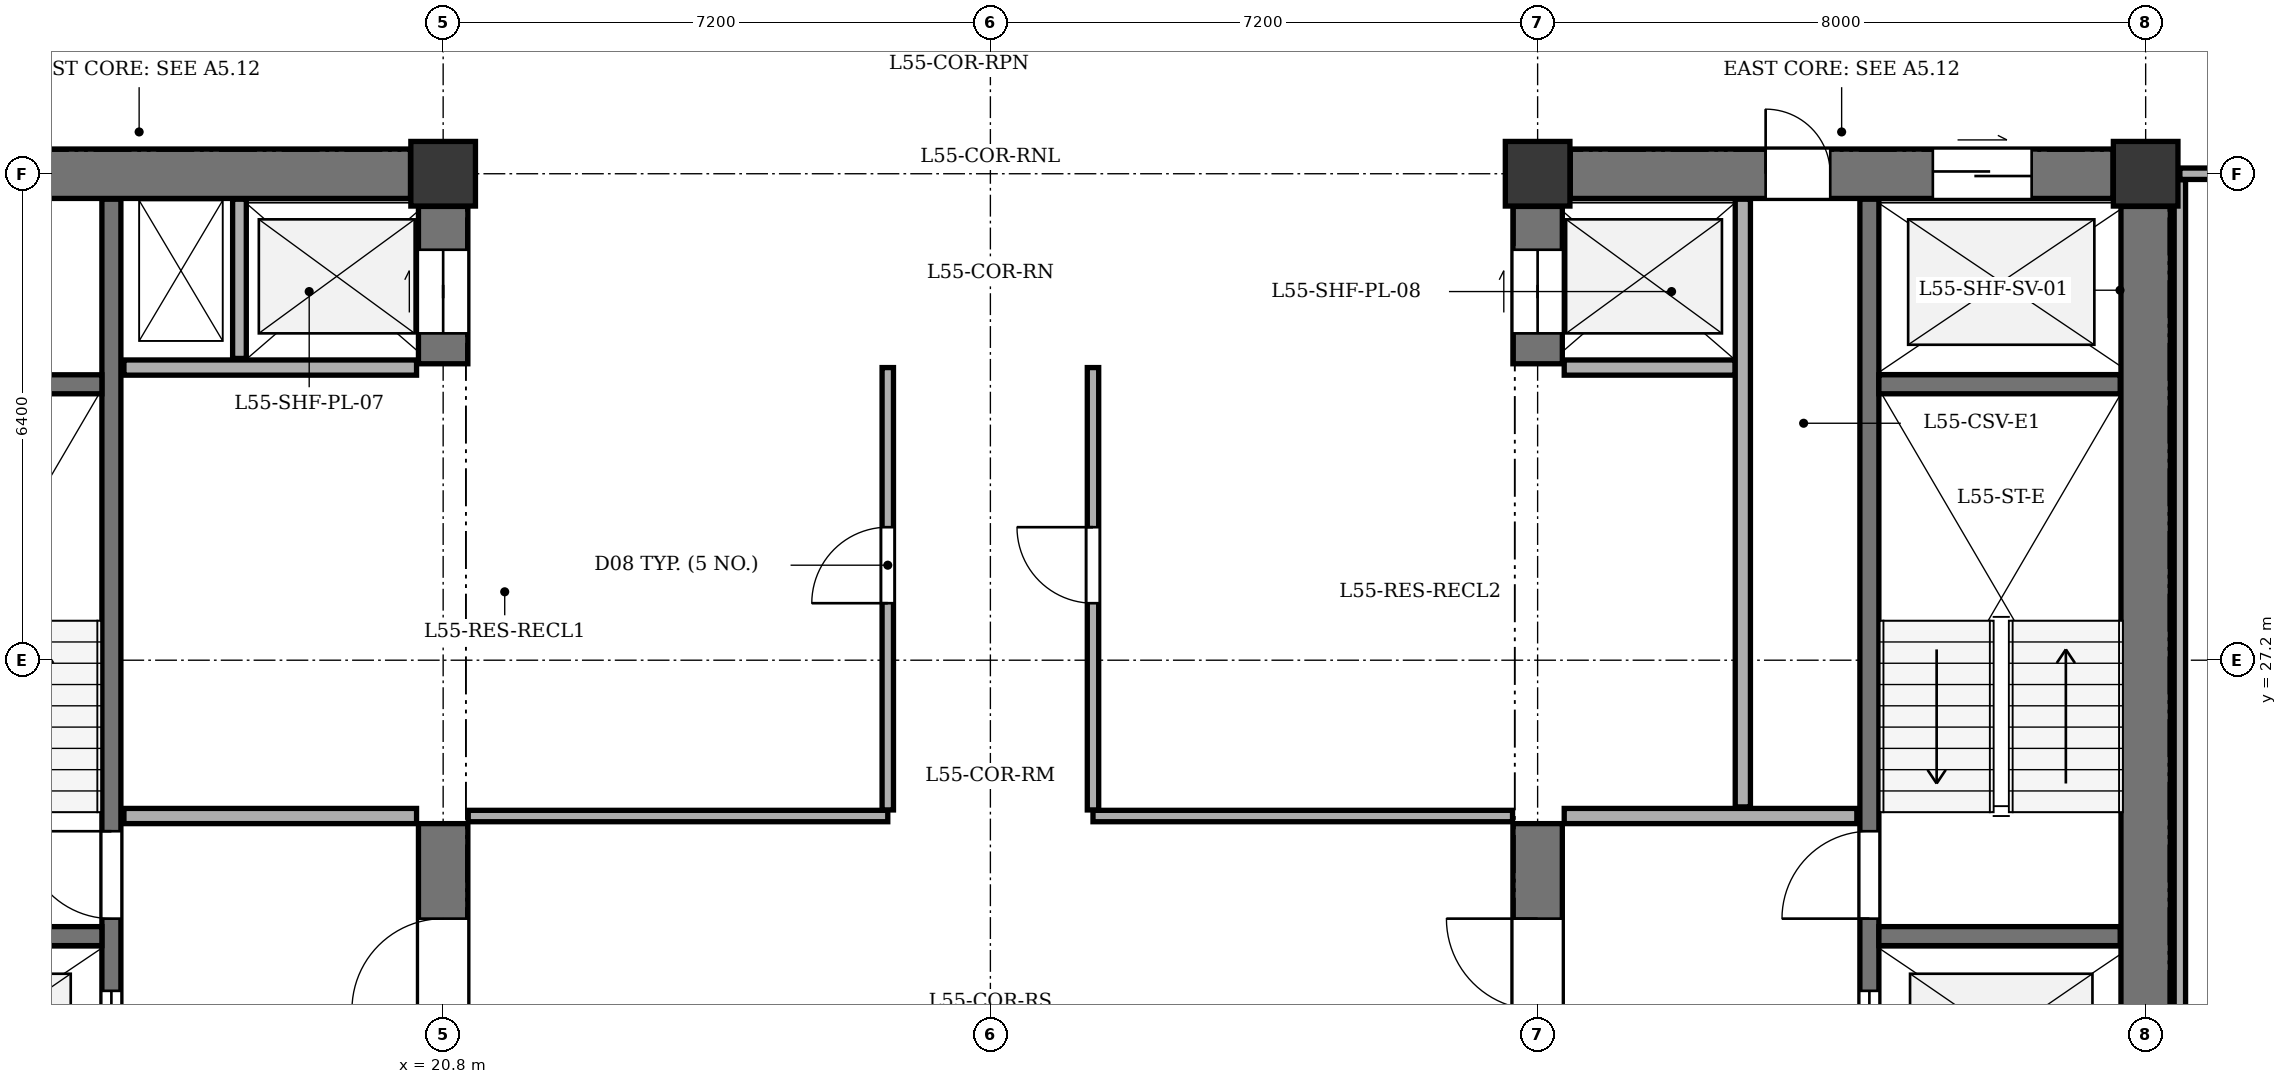
"""IFC4 building model, lengths in metres.
Left out: names, types, materials, properties, quantities, classifications, styles, units other than length and angle.
Written with IfcOpenShell. Run it as: python <this file> out.ifc"""

import sys

from ifc_helpers import new_model, si_unit, direction, frame, frame_2d, origin, origin_2d, place, context, subcontext, project, spatial, rectangle, extrude, element, fill, save


model = new_model("IFC4")
c1 = context("Model", 3, precision=1e-05, world=origin(), true_north=direction((0.0, 1.0)))
c2 = subcontext(c1, "Body", "Model", "MODEL_VIEW")
j1 = project(units=[si_unit("LENGTHUNIT", "METRE"), si_unit("PLANEANGLEUNIT", "RADIAN")], contexts=[c1])
p1 = place(None, origin())
s1 = spatial("IfcSite", under=j1, at=p1, CompositionType="ELEMENT")
p2 = place(p1, origin())
s2 = spatial("IfcBuilding", under=s1, at=p2, CompositionType="ELEMENT")
p3 = place(p2, frame((0.0, 0.0, 214.3)))
s3 = spatial("IfcBuildingStorey", under=s2, at=p3, CompositionType="ELEMENT", Elevation=214.3)
for number, where, z_axis, x_axis in (
    (1, (20.8, 33.6, 0.0), (0.0, 0.0, 1.0), (1.0, 0.0, 0.0)),
    (2, (35.2, 33.6, 0.0), (0.0, 0.0, 1.0), (1.0, 0.0, 0.0)),
    (3, (43.2, 33.6, 0.0), (0.0, 0.0, 1.0), (1.0, 0.0, 0.0)),
):
    element("IfcColumn", number, at=place(p3, frame(where, z_axis=z_axis, x_axis=x_axis)), inside=s3, PredefinedType="COLUMN", context=c2, shape_type="SweptSolid", body=[
        extrude(rectangle(XDim=0.85, YDim=0.85, at=origin_2d()), origin(), (0.0, 0.0, 1.0), 3.4),
    ])
p4 = place(p3, frame((13.23, 33.6, 0.0), z_axis=(0.0, 0.0, 1.0), x_axis=(1.0, 0.0, 0.0)))
e4 = element("IfcWall", 4, at=p4, inside=s3, PredefinedType="SHEAR", context=c2, shape_type="SweptSolid", body=[
    extrude(rectangle(XDim=7.14, YDim=0.65, at=frame_2d((3.57, 0.0))), origin(), (0.0, 0.0, 1.0), 3.1),
])
p5 = place(p4, frame((1.17, 0.0, 0.0)))
e5 = element("IfcOpeningElement", 5, at=p5, cuts=e4, PredefinedType="OPENING", context=c2, shape_type="SweptSolid", body=[
    extrude(rectangle(XDim=0.85, YDim=2.02, at=frame_2d((0.425, 1.01))), frame((0.0, 0.335, 0.0), z_axis=(0.0, -1.0, 0.0), x_axis=(1.0, 0.0, 0.0)), (0.0, 0.0, 1.0), 0.67),
])
p6 = place(p3, frame((20.8, 21.23, 0.0), z_axis=(0.0, 0.0, 1.0), x_axis=(0.0, 1.0, 0.0)))
e6 = element("IfcWall", 6, at=p6, inside=s3, PredefinedType="SHEAR", context=c2, shape_type="SweptSolid", body=[
    extrude(rectangle(XDim=3.82, YDim=0.65, at=frame_2d((1.91, 0.0))), origin(), (0.0, 0.0, 1.0), 3.1),
])
p7 = place(p6, frame((1.37, 0.0, 0.0)))
e7 = element("IfcOpeningElement", 7, at=p7, cuts=e6, PredefinedType="OPENING", context=c2, shape_type="SweptSolid", body=[
    extrude(rectangle(XDim=1.2, YDim=2.15, at=frame_2d((0.6, 1.075))), frame((0.0, 0.335, 0.0), z_axis=(0.0, -1.0, 0.0), x_axis=(1.0, 0.0, 0.0)), (0.0, 0.0, 1.0), 0.67),
])
p8 = place(p3, frame((20.8, 31.1, 0.0), z_axis=(0.0, 0.0, 1.0), x_axis=(0.0, 1.0, 0.0)))
e8 = element("IfcWall", 8, at=p8, inside=s3, PredefinedType="SHEAR", context=c2, shape_type="SweptSolid", body=[
    extrude(rectangle(XDim=2.07, YDim=0.65, at=frame_2d((1.035, 0.0))), origin(), (0.0, 0.0, 1.0), 3.1),
])
p9 = place(p8, frame((0.4, 0.0, 0.0)))
e9 = element("IfcOpeningElement", 9, at=p9, cuts=e8, PredefinedType="OPENING", context=c2, shape_type="SweptSolid", body=[
    extrude(rectangle(XDim=1.1, YDim=2.1, at=frame_2d((0.55, 1.05))), frame((0.0, 0.335, 0.0), z_axis=(0.0, -1.0, 0.0), x_axis=(1.0, 0.0, 0.0)), (0.0, 0.0, 1.0), 0.67),
])
p10 = place(p3, frame((16.435, 21.135, 0.0), z_axis=(0.0, 0.0, 1.0), x_axis=(0.0, 1.0, 0.0)))
e10 = element("IfcWall", 10, at=p10, inside=s3, PredefinedType="SHEAR", context=c2, shape_type="SweptSolid", body=[
    extrude(rectangle(XDim=12.13, YDim=0.25, at=frame_2d((6.065, 0.0))), origin(), (0.0, 0.0, 1.0), 3.1),
])
p11 = place(p10, frame((0.515, 0.0, 0.0)))
e11 = element("IfcOpeningElement", 11, at=p11, cuts=e10, PredefinedType="OPENING", context=c2, shape_type="SweptSolid", body=[
    extrude(rectangle(XDim=1.2, YDim=2.15, at=frame_2d((0.6, 1.075))), frame((0.0, 0.135, 0.0), z_axis=(0.0, -1.0, 0.0), x_axis=(1.0, 0.0, 0.0)), (0.0, 0.0, 1.0), 0.27),
])
p12 = place(p10, frame((2.665, 0.0, 0.0)))
e12 = element("IfcOpeningElement", 12, at=p12, cuts=e10, PredefinedType="OPENING", context=c2, shape_type="SweptSolid", body=[
    extrude(rectangle(XDim=1.15, YDim=2.15, at=frame_2d((0.575, 1.075))), frame((0.0, 0.135, 0.0), z_axis=(0.0, -1.0, 0.0), x_axis=(1.0, 0.0, 0.0)), (0.0, 0.0, 1.0), 0.27),
])
for number, where, z_axis, x_axis in (
    (13, (13.135, 23.57, 0.0), (0.0, 0.0, 1.0), (1.0, 0.0, 0.0)),
    (14, (13.135, 30.83, 0.0), (0.0, 0.0, 1.0), (1.0, 0.0, 0.0)),
):
    element("IfcWall", number, at=place(p3, frame(where, z_axis=z_axis, x_axis=x_axis)), inside=s3, PredefinedType="SHEAR", context=c2, shape_type="SweptSolid", body=[
        extrude(rectangle(XDim=3.175, YDim=0.25, at=frame_2d((1.587, 0.0))), origin(), (0.0, 0.0, 1.0), 3.1),
    ])
for number, where, z_axis, x_axis in (
    (15, (16.6, 25.15, 0.0), (0.0, 0.0, 1.0), (1.0, 0.0, 0.0)),
    (16, (16.6, 31.05, 0.0), (0.0, 0.0, 1.0), (1.0, 0.0, 0.0)),
):
    element("IfcWall", number, at=place(p3, frame(where, z_axis=z_axis, x_axis=x_axis)), inside=s3, PredefinedType="SOLIDWALL", context=c2, shape_type="SweptSolid", body=[
        extrude(rectangle(XDim=3.85, YDim=0.2, at=frame_2d((1.925, 0.0))), origin(), (0.0, 0.0, 1.0), 3.1),
    ])
p13 = place(p3, frame((18.12, 31.17, 0.0), z_axis=(0.0, 0.0, 1.0), x_axis=(0.0, 1.0, 0.0)))
e17 = element("IfcWall", 17, at=p13, inside=s3, PredefinedType="PARTITIONING", context=c2, shape_type="SweptSolid", body=[
    extrude(rectangle(XDim=2.095, YDim=0.18, at=frame_2d((1.047, 0.0))), origin(), (0.0, 0.0, 1.0), 3.1),
])
p14 = place(p3, frame((43.2, 21.23, 0.0), z_axis=(0.0, 0.0, 1.0), x_axis=(0.0, 1.0, 0.0)))
e18 = element("IfcWall", 18, at=p14, inside=s3, PredefinedType="SHEAR", context=c2, shape_type="SweptSolid", body=[
    extrude(rectangle(XDim=11.94, YDim=0.65, at=frame_2d((5.97, 0.0))), origin(), (0.0, 0.0, 1.0), 3.1),
])
p15 = place(p3, frame((35.63, 33.6, 0.0), z_axis=(0.0, 0.0, 1.0), x_axis=(1.0, 0.0, 0.0)))
e19 = element("IfcWall", 19, at=p15, inside=s3, PredefinedType="SHEAR", context=c2, shape_type="SweptSolid", body=[
    extrude(rectangle(XDim=7.14, YDim=0.65, at=frame_2d((3.57, 0.0))), origin(), (0.0, 0.0, 1.0), 3.1),
])
p16 = place(p15, frame((4.77, 0.0, 0.0)))
e20 = element("IfcOpeningElement", 20, at=p16, cuts=e19, PredefinedType="OPENING", context=c2, shape_type="SweptSolid", body=[
    extrude(rectangle(XDim=1.3, YDim=2.15, at=frame_2d((0.65, 1.075))), frame((0.0, 0.335, 0.0), z_axis=(0.0, -1.0, 0.0), x_axis=(1.0, 0.0, 0.0)), (0.0, 0.0, 1.0), 0.67),
])
p17 = place(p15, frame((2.57, 0.0, 0.0)))
e21 = element("IfcOpeningElement", 21, at=p17, cuts=e19, PredefinedType="OPENING", context=c2, shape_type="SweptSolid", body=[
    extrude(rectangle(XDim=0.85, YDim=2.02, at=frame_2d((0.425, 1.01))), frame((0.0, 0.335, 0.0), z_axis=(0.0, -1.0, 0.0), x_axis=(1.0, 0.0, 0.0)), (0.0, 0.0, 1.0), 0.67),
])
p18 = place(p3, frame((35.2, 21.23, 0.0), z_axis=(0.0, 0.0, 1.0), x_axis=(0.0, 1.0, 0.0)))
e22 = element("IfcWall", 22, at=p18, inside=s3, PredefinedType="SHEAR", context=c2, shape_type="SweptSolid", body=[
    extrude(rectangle(XDim=3.82, YDim=0.65, at=frame_2d((1.91, 0.0))), origin(), (0.0, 0.0, 1.0), 3.1),
])
p19 = place(p18, frame((1.37, 0.0, 0.0)))
e23 = element("IfcOpeningElement", 23, at=p19, cuts=e22, PredefinedType="OPENING", context=c2, shape_type="SweptSolid", body=[
    extrude(rectangle(XDim=1.2, YDim=2.15, at=frame_2d((0.6, 1.075))), frame((0.0, 0.335, 0.0), z_axis=(0.0, -1.0, 0.0), x_axis=(1.0, 0.0, 0.0)), (0.0, 0.0, 1.0), 0.67),
])
p20 = place(p3, frame((35.2, 31.1, 0.0), z_axis=(0.0, 0.0, 1.0), x_axis=(0.0, 1.0, 0.0)))
e24 = element("IfcWall", 24, at=p20, inside=s3, PredefinedType="SHEAR", context=c2, shape_type="SweptSolid", body=[
    extrude(rectangle(XDim=2.07, YDim=0.65, at=frame_2d((1.035, 0.0))), origin(), (0.0, 0.0, 1.0), 3.1),
])
p21 = place(p20, frame((0.4, 0.0, 0.0)))
e25 = element("IfcOpeningElement", 25, at=p21, cuts=e24, PredefinedType="OPENING", context=c2, shape_type="SweptSolid", body=[
    extrude(rectangle(XDim=1.1, YDim=2.1, at=frame_2d((0.55, 1.05))), frame((0.0, 0.335, 0.0), z_axis=(0.0, -1.0, 0.0), x_axis=(1.0, 0.0, 0.0)), (0.0, 0.0, 1.0), 0.67),
])
p22 = place(p3, frame((39.565, 21.135, 0.0), z_axis=(0.0, 0.0, 1.0), x_axis=(0.0, 1.0, 0.0)))
e26 = element("IfcWall", 26, at=p22, inside=s3, PredefinedType="SHEAR", context=c2, shape_type="SweptSolid", body=[
    extrude(rectangle(XDim=12.13, YDim=0.25, at=frame_2d((6.065, 0.0))), origin(), (0.0, 0.0, 1.0), 3.1),
])
p23 = place(p22, frame((0.515, 0.0, 0.0)))
e27 = element("IfcOpeningElement", 27, at=p23, cuts=e26, PredefinedType="OPENING", context=c2, shape_type="SweptSolid", body=[
    extrude(rectangle(XDim=1.2, YDim=2.15, at=frame_2d((0.6, 1.075))), frame((0.0, 0.135, 0.0), z_axis=(0.0, -1.0, 0.0), x_axis=(1.0, 0.0, 0.0)), (0.0, 0.0, 1.0), 0.27),
])
p24 = place(p22, frame((2.665, 0.0, 0.0)))
e28 = element("IfcOpeningElement", 28, at=p24, cuts=e26, PredefinedType="OPENING", context=c2, shape_type="SweptSolid", body=[
    extrude(rectangle(XDim=1.15, YDim=2.15, at=frame_2d((0.575, 1.075))), frame((0.0, 0.135, 0.0), z_axis=(0.0, -1.0, 0.0), x_axis=(1.0, 0.0, 0.0)), (0.0, 0.0, 1.0), 0.27),
])
for number, where, z_axis, x_axis in (
    (29, (39.69, 23.57, 0.0), (0.0, 0.0, 1.0), (1.0, 0.0, 0.0)),
    (30, (39.69, 30.83, 0.0), (0.0, 0.0, 1.0), (1.0, 0.0, 0.0)),
):
    element("IfcWall", number, at=place(p3, frame(where, z_axis=z_axis, x_axis=x_axis)), inside=s3, PredefinedType="SHEAR", context=c2, shape_type="SweptSolid", body=[
        extrude(rectangle(XDim=3.175, YDim=0.25, at=frame_2d((1.587, 0.0))), origin(), (0.0, 0.0, 1.0), 3.1),
    ])
p25 = place(p3, frame((35.55, 25.15, 0.0), z_axis=(0.0, 0.0, 1.0), x_axis=(1.0, 0.0, 0.0)))
e31 = element("IfcWall", 31, at=p25, inside=s3, PredefinedType="SOLIDWALL", context=c2, shape_type="SweptSolid", body=[
    extrude(rectangle(XDim=3.85, YDim=0.2, at=frame_2d((1.925, 0.0))), origin(), (0.0, 0.0, 1.0), 3.1),
])
p26 = place(p3, frame((35.55, 31.05, 0.0), z_axis=(0.0, 0.0, 1.0), x_axis=(1.0, 0.0, 0.0)))
e32 = element("IfcWall", 32, at=p26, inside=s3, PredefinedType="SOLIDWALL", context=c2, shape_type="SweptSolid", body=[
    extrude(rectangle(XDim=2.25, YDim=0.2, at=frame_2d((1.125, 0.0))), origin(), (0.0, 0.0, 1.0), 3.1),
])
p27 = place(p3, frame((37.9, 25.27, 0.0), z_axis=(0.0, 0.0, 1.0), x_axis=(0.0, 1.0, 0.0)))
e33 = element("IfcWall", 33, at=p27, inside=s3, PredefinedType="SOLIDWALL", context=c2, shape_type="SweptSolid", body=[
    extrude(rectangle(XDim=7.995, YDim=0.2, at=frame_2d((3.998, 0.0))), origin(), (0.0, 0.0, 1.0), 3.1),
])
for number, where, z_axis, x_axis in (
    (34, (21.13, 25.15, 0.0), (0.0, 0.0, 1.0), (1.0, 0.0, 0.0)),
    (35, (29.35, 25.15, 0.0), (0.0, 0.0, 1.0), (1.0, 0.0, 0.0)),
):
    element("IfcWall", number, at=place(p3, frame(where, z_axis=z_axis, x_axis=x_axis)), inside=s3, PredefinedType="PARTITIONING", context=c2, shape_type="SweptSolid", body=[
        extrude(rectangle(XDim=5.52, YDim=0.15, at=frame_2d((2.76, 0.0))), origin(), (0.0, 0.0, 1.0), 3.1),
    ])
p28 = place(p3, frame((26.65, 25.23, 0.0), z_axis=(0.0, 0.0, 1.0), x_axis=(0.0, 1.0, 0.0)))
e36 = element("IfcWall", 36, at=p28, inside=s3, PredefinedType="PARTITIONING", context=c2, shape_type="SweptSolid", body=[
    extrude(rectangle(XDim=5.82, YDim=0.15, at=frame_2d((2.91, 0.0))), origin(), (0.0, 0.0, 1.0), 3.1),
])
p29 = place(p28, frame((2.72, 0.0, 0.0)))
e37 = element("IfcOpeningElement", 37, at=p29, cuts=e36, PredefinedType="OPENING", context=c2, shape_type="SweptSolid", body=[
    extrude(rectangle(XDim=1.0, YDim=2.1, at=frame_2d((0.5, 1.05))), frame((0.0, 0.085, 0.0), z_axis=(0.0, -1.0, 0.0), x_axis=(1.0, 0.0, 0.0)), (0.0, 0.0, 1.0), 0.17),
])
p30 = place(p3, frame((29.35, 25.23, 0.0), z_axis=(0.0, 0.0, 1.0), x_axis=(0.0, 1.0, 0.0)))
e38 = element("IfcWall", 38, at=p30, inside=s3, PredefinedType="PARTITIONING", context=c2, shape_type="SweptSolid", body=[
    extrude(rectangle(XDim=5.82, YDim=0.15, at=frame_2d((2.91, 0.0))), origin(), (0.0, 0.0, 1.0), 3.1),
])
p31 = place(p30, frame((2.72, 0.0, 0.0)))
e39 = element("IfcOpeningElement", 39, at=p31, cuts=e38, PredefinedType="OPENING", context=c2, shape_type="SweptSolid", body=[
    extrude(rectangle(XDim=1.0, YDim=2.1, at=frame_2d((0.5, 1.05))), frame((0.0, 0.085, 0.0), z_axis=(0.0, -1.0, 0.0), x_axis=(1.0, 0.0, 0.0)), (0.0, 0.0, 1.0), 0.17),
])
p32 = place(p3, frame((43.65, 33.6, 0.0), z_axis=(0.0, 0.0, 1.0), x_axis=(1.0, 0.0, 0.0)))
e40 = element("IfcWall", 40, at=p32, inside=s3, PredefinedType="PARTITIONING", context=c2, shape_type="SweptSolid", body=[
    extrude(rectangle(XDim=5.305, YDim=0.15, at=frame_2d((2.653, 0.0))), origin(), (0.0, 0.0, 1.0), 2.535),
])
p33 = place(p3, frame((43.65, 20.25, 0.0), z_axis=(0.0, 0.0, 1.0), x_axis=(0.0, 1.0, 0.0)))
e41 = element("IfcWall", 41, at=p33, inside=s3, PredefinedType="PARTITIONING", context=c2, shape_type="SweptSolid", body=[
    extrude(rectangle(XDim=13.27, YDim=0.15, at=frame_2d((6.635, 0.0))), origin(), (0.0, 0.0, 1.0), 3.1),
])
p34 = place(p7, origin())
e42 = element("IfcDoor", 42, at=p34, inside=s3, OperationType="SINGLE_SWING_LEFT", PredefinedType="DOOR", context=c2, shape_type="SweptSolid", body=[
    extrude(rectangle(XDim=1.2, YDim=2.15, at=frame_2d((0.6, 1.075))), frame((0.0, 0.025, 0.0), z_axis=(0.0, -1.0, 0.0), x_axis=(1.0, 0.0, 0.0)), (0.0, 0.0, 1.0), 0.05),
])
fill(e7, e42)
p35 = place(p9, origin())
e43 = element("IfcDoor", 43, at=p35, inside=s3, OperationType="DOUBLE_DOOR_SLIDING", PredefinedType="DOOR", context=c2, shape_type="SweptSolid", body=[
    extrude(rectangle(XDim=1.1, YDim=2.1, at=frame_2d((0.55, 1.05))), frame((0.0, 0.025, 0.0), z_axis=(0.0, -1.0, 0.0), x_axis=(1.0, 0.0, 0.0)), (0.0, 0.0, 1.0), 0.05),
])
fill(e9, e43)
p36 = place(p11, origin())
e44 = element("IfcDoor", 44, at=p36, inside=s3, OperationType="DOUBLE_DOOR_SLIDING", PredefinedType="DOOR", context=c2, shape_type="SweptSolid", body=[
    extrude(rectangle(XDim=1.2, YDim=2.15, at=frame_2d((0.6, 1.075))), frame((0.0, 0.025, 0.0), z_axis=(0.0, -1.0, 0.0), x_axis=(1.0, 0.0, 0.0)), (0.0, 0.0, 1.0), 0.05),
])
fill(e11, e44)
p37 = place(p12, origin())
e45 = element("IfcDoor", 45, at=p37, inside=s3, OperationType="SINGLE_SWING_RIGHT", PredefinedType="DOOR", context=c2, shape_type="SweptSolid", body=[
    extrude(rectangle(XDim=1.15, YDim=2.15, at=frame_2d((0.575, 1.075))), frame((0.0, 0.025, 0.0), z_axis=(0.0, -1.0, 0.0), x_axis=(1.0, 0.0, 0.0)), (0.0, 0.0, 1.0), 0.05),
])
fill(e12, e45)
p38 = place(p16, origin())
e46 = element("IfcDoor", 46, at=p38, inside=s3, OperationType="DOUBLE_DOOR_SLIDING", PredefinedType="DOOR", context=c2, shape_type="SweptSolid", body=[
    extrude(rectangle(XDim=1.3, YDim=2.15, at=frame_2d((0.65, 1.075))), frame((0.0, 0.025, 0.0), z_axis=(0.0, -1.0, 0.0), x_axis=(1.0, 0.0, 0.0)), (0.0, 0.0, 1.0), 0.05),
])
fill(e20, e46)
p39 = place(p17, origin())
e47 = element("IfcDoor", 47, at=p39, inside=s3, OperationType="SINGLE_SWING_LEFT", PredefinedType="DOOR", context=c2, shape_type="SweptSolid", body=[
    extrude(rectangle(XDim=0.85, YDim=2.02, at=frame_2d((0.425, 1.01))), frame((0.0, 0.025, 0.0), z_axis=(0.0, -1.0, 0.0), x_axis=(1.0, 0.0, 0.0)), (0.0, 0.0, 1.0), 0.05),
])
fill(e21, e47)
p40 = place(p19, origin())
e48 = element("IfcDoor", 48, at=p40, inside=s3, OperationType="SINGLE_SWING_RIGHT", PredefinedType="DOOR", context=c2, shape_type="SweptSolid", body=[
    extrude(rectangle(XDim=1.2, YDim=2.15, at=frame_2d((0.6, 1.075))), frame((0.0, 0.025, 0.0), z_axis=(0.0, -1.0, 0.0), x_axis=(1.0, 0.0, 0.0)), (0.0, 0.0, 1.0), 0.05),
])
fill(e23, e48)
p41 = place(p21, origin())
e49 = element("IfcDoor", 49, at=p41, inside=s3, OperationType="DOUBLE_DOOR_SLIDING", PredefinedType="DOOR", context=c2, shape_type="SweptSolid", body=[
    extrude(rectangle(XDim=1.1, YDim=2.1, at=frame_2d((0.55, 1.05))), frame((0.0, 0.025, 0.0), z_axis=(0.0, -1.0, 0.0), x_axis=(1.0, 0.0, 0.0)), (0.0, 0.0, 1.0), 0.05),
])
fill(e25, e49)
p42 = place(p23, origin())
e50 = element("IfcDoor", 50, at=p42, inside=s3, OperationType="DOUBLE_DOOR_SLIDING", PredefinedType="DOOR", context=c2, shape_type="SweptSolid", body=[
    extrude(rectangle(XDim=1.2, YDim=2.15, at=frame_2d((0.6, 1.075))), frame((0.0, 0.025, 0.0), z_axis=(0.0, -1.0, 0.0), x_axis=(1.0, 0.0, 0.0)), (0.0, 0.0, 1.0), 0.05),
])
fill(e27, e50)
p43 = place(p24, origin())
e51 = element("IfcDoor", 51, at=p43, inside=s3, OperationType="SINGLE_SWING_LEFT", PredefinedType="DOOR", context=c2, shape_type="SweptSolid", body=[
    extrude(rectangle(XDim=1.15, YDim=2.15, at=frame_2d((0.575, 1.075))), frame((0.0, 0.025, 0.0), z_axis=(0.0, -1.0, 0.0), x_axis=(1.0, 0.0, 0.0)), (0.0, 0.0, 1.0), 0.05),
])
fill(e28, e51)
p44 = place(p29, origin())
e52 = element("IfcDoor", 52, at=p44, inside=s3, OperationType="SINGLE_SWING_LEFT", PredefinedType="DOOR", context=c2, shape_type="SweptSolid", body=[
    extrude(rectangle(XDim=1.0, YDim=2.1, at=frame_2d((0.5, 1.05))), frame((0.0, 0.025, 0.0), z_axis=(0.0, -1.0, 0.0), x_axis=(1.0, 0.0, 0.0)), (0.0, 0.0, 1.0), 0.05),
])
fill(e37, e52)
p45 = place(p31, origin())
e53 = element("IfcDoor", 53, at=p45, inside=s3, OperationType="SINGLE_SWING_RIGHT", PredefinedType="DOOR", context=c2, shape_type="SweptSolid", body=[
    extrude(rectangle(XDim=1.0, YDim=2.1, at=frame_2d((0.5, 1.05))), frame((0.0, 0.025, 0.0), z_axis=(0.0, -1.0, 0.0), x_axis=(1.0, 0.0, 0.0)), (0.0, 0.0, 1.0), 0.05),
])
fill(e39, e53)
save(model, sys.argv[1])
